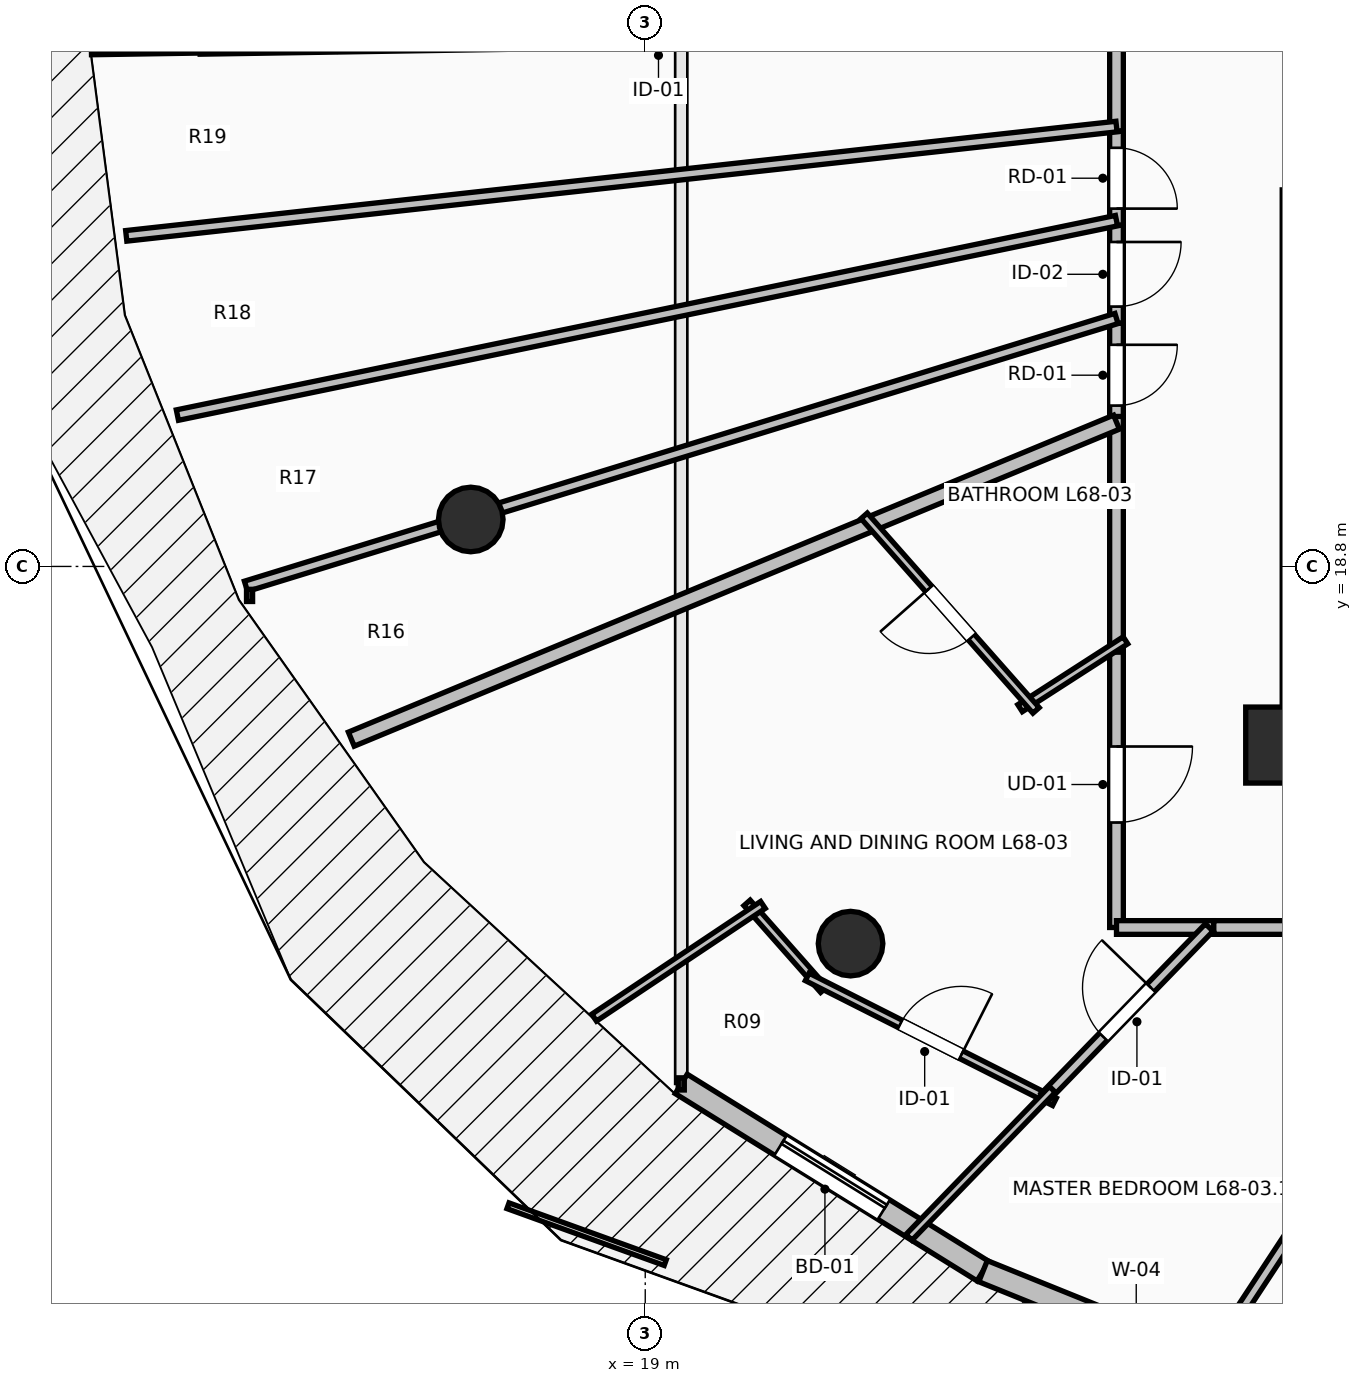
"""IFC4 building model, lengths in metres.
Left out: names, types, materials, properties, quantities, classifications, styles, units other than length and angle.
Written with IfcOpenShell. Run it as: python <this file> out.ifc"""

import sys

from ifc_helpers import new_model, si_unit, direction, frame, frame_2d, origin, origin_2d, place, context, subcontext, project, spatial, rectangle, circle, extrude, element, fill, save


model = new_model("IFC4")
c1 = context("Model", 3, precision=1e-05, world=origin(), true_north=direction((0.0, 1.0)))
c2 = subcontext(c1, "Body", "Model", "MODEL_VIEW")
j1 = project(units=[si_unit("LENGTHUNIT", "METRE"), si_unit("PLANEANGLEUNIT", "RADIAN")], contexts=[c1])
p1 = place(None, origin())
s1 = spatial("IfcSite", under=j1, at=p1, CompositionType="ELEMENT")
p2 = place(p1, origin())
s2 = spatial("IfcBuilding", under=s1, at=p2, CompositionType="ELEMENT")
p3 = place(p2, frame((0.0, 0.0, 252.0)))
s3 = spatial("IfcBuildingStorey", under=s2, at=p3, CompositionType="ELEMENT", Elevation=252.0)
for number, where, z_axis, x_axis in (
    (1, (16.705, 19.418, 0.0), (0.0, 0.0, 1.0), (-0.924, -0.383, 0.0)),
    (2, (21.701, 13.838, 0.0), (0.0, 0.0, 1.0), (-0.707, -0.707, 0.0)),
):
    element("IfcColumn", number, at=place(p3, frame(where, z_axis=z_axis, x_axis=x_axis)), inside=s3, PredefinedType="COLUMN", context=c2, shape_type="SweptSolid", body=[
        extrude(circle(Radius=0.425, at=origin_2d()), origin(), (0.0, 0.0, 1.0), 3.55),
    ])
p4 = place(p3, frame((27.25, 16.45, 0.0), z_axis=(0.0, 0.0, 1.0), x_axis=(1.0, 0.0, 0.0)))
e3 = element("IfcColumn", 3, at=p4, inside=s3, PredefinedType="PILASTER", context=c2, shape_type="SweptSolid", body=[
    extrude(rectangle(XDim=0.7, YDim=1.0, at=origin_2d()), origin(), (0.0, 0.0, 1.0), 3.55),
])
p5 = place(p3, frame((19.474, 11.992, 0.0), z_axis=(0.0, 0.0, 1.0), x_axis=(0.849702323036, -0.527262707032, 0.0)))
e4 = element("IfcWall", 4, at=p5, inside=s3, PredefinedType="STANDARD", context=c2, shape_type="SweptSolid", body=[
    extrude(rectangle(XDim=4.672, YDim=0.3, at=frame_2d((2.336, 0.0))), origin(), (0.0, 0.0, 1.0), 3.29),
])
p6 = place(p5, frame((1.536, 0.0, 0.0)))
e5 = element("IfcOpeningElement", 5, at=p6, cuts=e4, PredefinedType="OPENING", context=c2, shape_type="SweptSolid", body=[
    extrude(rectangle(XDim=1.6, YDim=2.3, at=frame_2d((0.8, 1.15))), frame((0.0, 0.165, 0.0), z_axis=(0.0, -1.0, 0.0), x_axis=(1.0, 0.0, 0.0)), (0.0, 0.0, 1.0), 0.33),
])
p7 = place(p3, frame((23.444, 9.529, 0.0), z_axis=(0.0, 0.0, 1.0), x_axis=(0.927147375511, -0.374696869594, 0.0)))
e6 = element("IfcWall", 6, at=p7, inside=s3, PredefinedType="STANDARD", context=c2, shape_type="SweptSolid", body=[
    extrude(rectangle(XDim=4.885, YDim=0.3, at=frame_2d((2.443, 0.0))), origin(), (0.0, 0.0, 1.0), 3.29),
])
p8 = place(p7, frame((1.574, 0.0, 0.85)))
e7 = element("IfcOpeningElement", 7, at=p8, cuts=e6, PredefinedType="OPENING", context=c2, shape_type="SweptSolid", body=[
    extrude(rectangle(XDim=1.2, YDim=1.95, at=frame_2d((0.6, 0.975))), frame((0.0, 0.165, 0.0), z_axis=(0.0, -1.0, 0.0), x_axis=(1.0, 0.0, 0.0)), (0.0, 0.0, 1.0), 0.33),
])
p9 = place(p7, frame((3.606, 0.0, 0.85)))
e8 = element("IfcOpeningElement", 8, at=p9, cuts=e6, PredefinedType="OPENING", context=c2, shape_type="SweptSolid", body=[
    extrude(rectangle(XDim=0.9, YDim=1.8, at=frame_2d((0.45, 0.9))), frame((0.0, 0.165, 0.0), z_axis=(0.0, -1.0, 0.0), x_axis=(1.0, 0.0, 0.0)), (0.0, 0.0, 1.0), 0.33),
])
p10 = place(p3, frame((25.2, 25.739, 0.0), z_axis=(0.0, 0.0, 1.0), x_axis=(0.0, -1.0, 0.0)))
e9 = element("IfcWall", 9, at=p10, inside=s3, PredefinedType="PARTITIONING", context=c2, shape_type="SweptSolid", body=[
    extrude(rectangle(XDim=1.212, YDim=0.18, at=frame_2d((0.606, 0.0))), origin(), (0.0, 0.0, 1.0), 3.29),
])
p11 = place(p3, frame((25.2, 24.527, 0.0), z_axis=(0.0, 0.0, 1.0), x_axis=(0.0, -1.0, 0.0)))
e10 = element("IfcWall", 10, at=p11, inside=s3, PredefinedType="PARTITIONING", context=c2, shape_type="SweptSolid", body=[
    extrude(rectangle(XDim=1.239, YDim=0.18, at=frame_2d((0.62, 0.0))), origin(), (0.0, 0.0, 1.0), 3.29),
])
p12 = place(p11, frame((0.219, 0.0, 0.0)))
e11 = element("IfcOpeningElement", 11, at=p12, cuts=e10, PredefinedType="OPENING", context=c2, shape_type="SweptSolid", body=[
    extrude(rectangle(XDim=0.8, YDim=2.05, at=frame_2d((0.4, 1.025))), frame((0.0, 0.105, 0.0), z_axis=(0.0, -1.0, 0.0), x_axis=(1.0, 0.0, 0.0)), (0.0, 0.0, 1.0), 0.21),
])
p13 = place(p3, frame((25.2, 23.288, 0.0), z_axis=(0.0, 0.0, 1.0), x_axis=(0.0, -1.0, 0.0)))
e12 = element("IfcWall", 12, at=p13, inside=s3, PredefinedType="PARTITIONING", context=c2, shape_type="SweptSolid", body=[
    extrude(rectangle(XDim=1.289, YDim=0.18, at=frame_2d((0.645, 0.0))), origin(), (0.0, 0.0, 1.0), 3.29),
])
p14 = place(p13, frame((0.219, 0.0, 0.0)))
e13 = element("IfcOpeningElement", 13, at=p14, cuts=e12, PredefinedType="OPENING", context=c2, shape_type="SweptSolid", body=[
    extrude(rectangle(XDim=0.85, YDim=2.1, at=frame_2d((0.425, 1.05))), frame((0.0, 0.105, 0.0), z_axis=(0.0, -1.0, 0.0), x_axis=(1.0, 0.0, 0.0)), (0.0, 0.0, 1.0), 0.21),
])
p15 = place(p3, frame((25.2, 21.999, 0.0), z_axis=(0.0, 0.0, 1.0), x_axis=(0.0, -1.0, 0.0)))
e14 = element("IfcWall", 14, at=p15, inside=s3, PredefinedType="PARTITIONING", context=c2, shape_type="SweptSolid", body=[
    extrude(rectangle(XDim=1.366, YDim=0.18, at=frame_2d((0.683, 0.0))), origin(), (0.0, 0.0, 1.0), 3.29),
])
p16 = place(p15, frame((0.283, 0.0, 0.0)))
e15 = element("IfcOpeningElement", 15, at=p16, cuts=e14, PredefinedType="OPENING", context=c2, shape_type="SweptSolid", body=[
    extrude(rectangle(XDim=0.8, YDim=2.05, at=frame_2d((0.4, 1.025))), frame((0.0, 0.105, 0.0), z_axis=(0.0, -1.0, 0.0), x_axis=(1.0, 0.0, 0.0)), (0.0, 0.0, 1.0), 0.21),
])
p17 = place(p3, frame((25.2, 17.812, 0.0), z_axis=(0.0, 0.0, 1.0), x_axis=(0.0, -1.0, 0.0)))
e16 = element("IfcWall", 16, at=p17, inside=s3, PredefinedType="PARTITIONING", context=c2, shape_type="SweptSolid", body=[
    extrude(rectangle(XDim=3.762, YDim=0.18, at=frame_2d((1.881, 0.0))), origin(), (0.0, 0.0, 1.0), 2.482),
])
p18 = place(p17, frame((1.381, 0.0, 0.0)))
e17 = element("IfcOpeningElement", 17, at=p18, cuts=e16, PredefinedType="OPENING", context=c2, shape_type="SweptSolid", body=[
    extrude(rectangle(XDim=1.0, YDim=2.15, at=frame_2d((0.5, 1.075))), frame((0.0, 0.105, 0.0), z_axis=(0.0, -1.0, 0.0), x_axis=(1.0, 0.0, 0.0)), (0.0, 0.0, 1.0), 0.21),
])
p19 = place(p3, frame((25.2, 14.05, 0.0), z_axis=(0.0, 0.0, 1.0), x_axis=(1.0, 0.0, 0.0)))
e18 = element("IfcWall", 18, at=p19, inside=s3, PredefinedType="PARTITIONING", context=c2, shape_type="SweptSolid", body=[
    extrude(rectangle(XDim=1.28, YDim=0.18, at=frame_2d((0.64, 0.0))), origin(), (0.0, 0.0, 1.0), 2.972),
])
p20 = place(p3, frame((25.2, 20.773, 0.0), z_axis=(0.0, 0.0, 1.0), x_axis=(0.0, -1.0, 0.0)))
e19 = element("IfcWall", 19, at=p20, inside=s3, PredefinedType="PARTITIONING", context=c2, shape_type="SweptSolid", body=[
    extrude(rectangle(XDim=3.101, YDim=0.18, at=frame_2d((1.55, 0.0))), origin(), (0.0, 0.0, 1.0), 3.29),
])
p21 = place(p3, frame((26.48, 14.05, 0.0), z_axis=(0.0, 0.0, 1.0), x_axis=(1.0, 0.0, 0.0)))
e20 = element("IfcWall", 20, at=p21, inside=s3, PredefinedType="PARTITIONING", context=c2, shape_type="SweptSolid", body=[
    extrude(rectangle(XDim=3.73, YDim=0.18, at=frame_2d((1.865, 0.0))), origin(), (0.0, 0.0, 1.0), 2.482),
])
p22 = place(p3, frame((13.143, 25.609, 0.0), z_axis=(0.0, 0.0, 1.0), x_axis=(0.999875613351, 0.015772058374, 0.0)))
e21 = element("IfcWall", 21, at=p22, inside=s3, PredefinedType="PARTITIONING", context=c2, shape_type="SweptSolid", body=[
    extrude(rectangle(XDim=12.058, YDim=0.14, at=frame_2d((6.029, 0.0))), origin(), (0.0, 0.0, 1.0), 2.874),
])
p23 = place(p22, frame((5.579, 0.0, 0.0)))
e22 = element("IfcOpeningElement", 22, at=p23, cuts=e21, PredefinedType="OPENING", context=c2, shape_type="SweptSolid", body=[
    extrude(rectangle(XDim=0.9, YDim=2.1, at=frame_2d((0.45, 1.05))), frame((0.0, 0.085, 0.0), z_axis=(0.0, -1.0, 0.0), x_axis=(1.0, 0.0, 0.0)), (0.0, 0.0, 1.0), 0.17),
])
p24 = place(p3, frame((11.714, 25.587, 0.0), z_axis=(0.0, 0.0, 1.0), x_axis=(0.9998813462, 0.015404334465, 0.0)))
e23 = element("IfcWall", 23, at=p24, inside=s3, PredefinedType="PARTITIONING", context=c2, shape_type="SweptSolid", body=[
    extrude(rectangle(XDim=1.569, YDim=0.11, at=frame_2d((0.785, 0.0))), origin(), (0.0, 0.0, 1.0), 3.29),
])
p25 = place(p3, frame((12.172, 23.149, 0.0), z_axis=(0.0, 0.0, 1.0), x_axis=(0.993963433103, 0.109711866515, 0.0)))
e24 = element("IfcWall", 24, at=p25, inside=s3, PredefinedType="PARTITIONING", context=c2, shape_type="SweptSolid", body=[
    extrude(rectangle(XDim=13.107, YDim=0.14, at=frame_2d((6.553, 0.0))), origin(), (0.0, 0.0, 1.0), 2.874),
])
p26 = place(p3, frame((12.845, 20.791, 0.0), z_axis=(0.0, 0.0, 1.0), x_axis=(0.97923049011, 0.202750208975, 0.0)))
e25 = element("IfcWall", 25, at=p26, inside=s3, PredefinedType="PARTITIONING", context=c2, shape_type="SweptSolid", body=[
    extrude(rectangle(XDim=12.617, YDim=0.14, at=frame_2d((6.309, 0.0))), origin(), (0.0, 0.0, 1.0), 2.874),
])
p27 = place(p3, frame((13.747, 18.539, 0.0), z_axis=(0.0, 0.0, 1.0), x_axis=(0.955802794564, 0.294008533725, 0.0)))
e26 = element("IfcWall", 26, at=p27, inside=s3, PredefinedType="PARTITIONING", context=c2, shape_type="SweptSolid", body=[
    extrude(rectangle(XDim=11.982, YDim=0.14, at=frame_2d((5.991, 0.0))), origin(), (0.0, 0.0, 1.0), 2.482),
])
p28 = place(p3, frame((15.133, 16.528, 0.0), z_axis=(0.0, 0.0, 1.0), x_axis=(0.923877013663, 0.382689513347, 0.0)))
e27 = element("IfcWall", 27, at=p28, inside=s3, PredefinedType="PARTITIONING", context=c2, shape_type="SweptSolid", body=[
    extrude(rectangle(XDim=10.896, YDim=0.2, at=frame_2d((5.448, 0.0))), origin(), (0.0, 0.0, 1.0), 2.482),
])
p29 = place(p3, frame((25.318, 17.828, 0.0), z_axis=(0.0, 0.0, 1.0), x_axis=(-0.840783734709, -0.541371140207, 0.0)))
e28 = element("IfcWall", 28, at=p29, inside=s3, PredefinedType="PARTITIONING", context=c2, shape_type="SweptSolid", body=[
    extrude(rectangle(XDim=1.649, YDim=0.11, at=frame_2d((0.824, 0.0))), origin(), (0.0, 0.0, 1.0), 2.482),
])
p30 = place(p3, frame((24.142, 16.906, 0.0), z_axis=(0.0, 0.0, 1.0), x_axis=(-0.662044708061, 0.749464345068, 0.0)))
e29 = element("IfcWall", 29, at=p30, inside=s3, PredefinedType="PARTITIONING", context=c2, shape_type="SweptSolid", body=[
    extrude(rectangle(XDim=3.416, YDim=0.11, at=frame_2d((1.708, 0.0))), origin(), (0.0, 0.0, 1.0), 2.482),
])
p31 = place(p30, frame((1.283, 0.0, 0.0)))
e30 = element("IfcOpeningElement", 30, at=p31, cuts=e29, PredefinedType="OPENING", context=c2, shape_type="SweptSolid", body=[
    extrude(rectangle(XDim=0.85, YDim=2.1, at=frame_2d((0.425, 1.05))), frame((0.0, 0.07, 0.0), z_axis=(0.0, -1.0, 0.0), x_axis=(1.0, 0.0, 0.0)), (0.0, 0.0, 1.0), 0.14),
])
p32 = place(p3, frame((20.339, 14.374, 0.0), z_axis=(0.0, 0.0, 1.0), x_axis=(0.662352602393, -0.749192251764, 0.0)))
e31 = element("IfcWall", 31, at=p32, inside=s3, PredefinedType="PARTITIONING", context=c2, shape_type="SweptSolid", body=[
    extrude(rectangle(XDim=1.524, YDim=0.11, at=frame_2d((0.762, 0.0))), origin(), (0.0, 0.0, 1.0), 3.29),
])
p33 = place(p3, frame((21.131, 13.4, 0.0), z_axis=(0.0, 0.0, 1.0), x_axis=(0.892570631547, -0.450907604394, 0.0)))
e32 = element("IfcWall", 32, at=p33, inside=s3, PredefinedType="PARTITIONING", context=c2, shape_type="SweptSolid", body=[
    extrude(rectangle(XDim=3.645, YDim=0.11, at=frame_2d((1.822, 0.0))), origin(), (0.0, 0.0, 1.0), 3.29),
])
p34 = place(p33, frame((1.372, 0.0, 0.0)))
e33 = element("IfcOpeningElement", 33, at=p34, cuts=e32, PredefinedType="OPENING", context=c2, shape_type="SweptSolid", body=[
    extrude(rectangle(XDim=0.9, YDim=2.1, at=frame_2d((0.45, 1.05))), frame((0.0, 0.07, 0.0), z_axis=(0.0, -1.0, 0.0), x_axis=(1.0, 0.0, 0.0)), (0.0, 0.0, 1.0), 0.14),
])
p35 = place(p3, frame((18.328, 12.864, 0.0), z_axis=(0.0, 0.0, 1.0), x_axis=(0.831712526046, 0.555206514748, 0.0)))
e34 = element("IfcWall", 34, at=p35, inside=s3, PredefinedType="PARTITIONING", context=c2, shape_type="SweptSolid", body=[
    extrude(rectangle(XDim=2.67, YDim=0.11, at=frame_2d((1.335, 0.0))), origin(), (0.0, 0.0, 1.0), 3.29),
])
p36 = place(p3, frame((24.259, 11.82, 0.0), z_axis=(0.0, 0.0, 1.0), x_axis=(0.695894072482, 0.718144442215, 0.0)))
e35 = element("IfcWall", 35, at=p36, inside=s3, PredefinedType="PARTITIONING", context=c2, shape_type="SweptSolid", body=[
    extrude(rectangle(XDim=3.105, YDim=0.14, at=frame_2d((1.553, 0.0))), origin(), (0.0, 0.0, 1.0), 2.874),
])
p37 = place(p36, frame((1.103, 0.0, 0.0)))
e36 = element("IfcOpeningElement", 36, at=p37, cuts=e35, PredefinedType="OPENING", context=c2, shape_type="SweptSolid", body=[
    extrude(rectangle(XDim=0.9, YDim=2.1, at=frame_2d((0.45, 1.05))), frame((0.0, 0.085, 0.0), z_axis=(0.0, -1.0, 0.0), x_axis=(1.0, 0.0, 0.0)), (0.0, 0.0, 1.0), 0.17),
])
p38 = place(p3, frame((22.469, 9.973, 0.0), z_axis=(0.0, 0.0, 1.0), x_axis=(0.695944713466, 0.718095366786, 0.0)))
e37 = element("IfcWall", 37, at=p38, inside=s3, PredefinedType="PARTITIONING", context=c2, shape_type="SweptSolid", body=[
    extrude(rectangle(XDim=2.711, YDim=0.11, at=frame_2d((1.356, 0.0))), origin(), (0.0, 0.0, 1.0), 3.29),
])
p39 = place(p3, frame((26.397, 8.336, 0.0), z_axis=(0.0, 0.0, 1.0), x_axis=(0.548967647923, 0.835843598728, 0.0)))
e38 = element("IfcWall", 38, at=p39, inside=s3, PredefinedType="PARTITIONING", context=c2, shape_type="SweptSolid", body=[
    extrude(rectangle(XDim=6.836, YDim=0.14, at=frame_2d((3.418, 0.0))), origin(), (0.0, 0.0, 1.0), 2.482),
])
p40 = place(p6, origin())
e39 = element("IfcDoor", 39, at=p40, inside=s3, OperationType="SLIDING_TO_LEFT", PredefinedType="DOOR", context=c2, shape_type="SweptSolid", body=[
    extrude(rectangle(XDim=1.6, YDim=2.3, at=frame_2d((0.8, 1.15))), frame((0.0, 0.025, 0.0), z_axis=(0.0, -1.0, 0.0), x_axis=(1.0, 0.0, 0.0)), (0.0, 0.0, 1.0), 0.05),
])
fill(e5, e39)
p41 = place(p18, origin())
e40 = element("IfcDoor", 40, at=p41, inside=s3, OperationType="SINGLE_SWING_LEFT", PredefinedType="DOOR", context=c2, shape_type="SweptSolid", body=[
    extrude(rectangle(XDim=1.0, YDim=2.15, at=frame_2d((0.5, 1.075))), frame((0.0, 0.025, 0.0), z_axis=(0.0, -1.0, 0.0), x_axis=(1.0, 0.0, 0.0)), (0.0, 0.0, 1.0), 0.05),
])
fill(e17, e40)
p42 = place(p31, origin())
e41 = element("IfcDoor", 41, at=p42, inside=s3, OperationType="SINGLE_SWING_RIGHT", PredefinedType="DOOR", context=c2, shape_type="SweptSolid", body=[
    extrude(rectangle(XDim=0.85, YDim=2.1, at=frame_2d((0.425, 1.05))), frame((0.0, 0.025, 0.0), z_axis=(0.0, -1.0, 0.0), x_axis=(1.0, 0.0, 0.0)), (0.0, 0.0, 1.0), 0.05),
])
fill(e30, e41)
p43 = place(p34, origin())
e42 = element("IfcDoor", 42, at=p43, inside=s3, OperationType="SINGLE_SWING_RIGHT", PredefinedType="DOOR", context=c2, shape_type="SweptSolid", body=[
    extrude(rectangle(XDim=0.9, YDim=2.1, at=frame_2d((0.45, 1.05))), frame((0.0, 0.025, 0.0), z_axis=(0.0, -1.0, 0.0), x_axis=(1.0, 0.0, 0.0)), (0.0, 0.0, 1.0), 0.05),
])
fill(e33, e42)
p44 = place(p37, origin())
e43 = element("IfcDoor", 43, at=p44, inside=s3, OperationType="SINGLE_SWING_RIGHT", PredefinedType="DOOR", context=c2, shape_type="SweptSolid", body=[
    extrude(rectangle(XDim=0.9, YDim=2.1, at=frame_2d((0.45, 1.05))), frame((0.0, 0.025, 0.0), z_axis=(0.0, -1.0, 0.0), x_axis=(1.0, 0.0, 0.0)), (0.0, 0.0, 1.0), 0.05),
])
fill(e36, e43)
p45 = place(p12, origin())
e44 = element("IfcDoor", 44, at=p45, inside=s3, OperationType="SINGLE_SWING_RIGHT", PredefinedType="DOOR", context=c2, shape_type="SweptSolid", body=[
    extrude(rectangle(XDim=0.8, YDim=2.05, at=frame_2d((0.4, 1.025))), frame((0.0, 0.025, 0.0), z_axis=(0.0, -1.0, 0.0), x_axis=(1.0, 0.0, 0.0)), (0.0, 0.0, 1.0), 0.05),
])
fill(e11, e44)
p46 = place(p14, origin())
e45 = element("IfcDoor", 45, at=p46, inside=s3, OperationType="SINGLE_SWING_LEFT", PredefinedType="DOOR", context=c2, shape_type="SweptSolid", body=[
    extrude(rectangle(XDim=0.85, YDim=2.1, at=frame_2d((0.425, 1.05))), frame((0.0, 0.025, 0.0), z_axis=(0.0, -1.0, 0.0), x_axis=(1.0, 0.0, 0.0)), (0.0, 0.0, 1.0), 0.05),
])
fill(e13, e45)
p47 = place(p16, origin())
e46 = element("IfcDoor", 46, at=p47, inside=s3, OperationType="SINGLE_SWING_LEFT", PredefinedType="DOOR", context=c2, shape_type="SweptSolid", body=[
    extrude(rectangle(XDim=0.8, YDim=2.05, at=frame_2d((0.4, 1.025))), frame((0.0, 0.025, 0.0), z_axis=(0.0, -1.0, 0.0), x_axis=(1.0, 0.0, 0.0)), (0.0, 0.0, 1.0), 0.05),
])
fill(e15, e46)
save(model, sys.argv[1])
